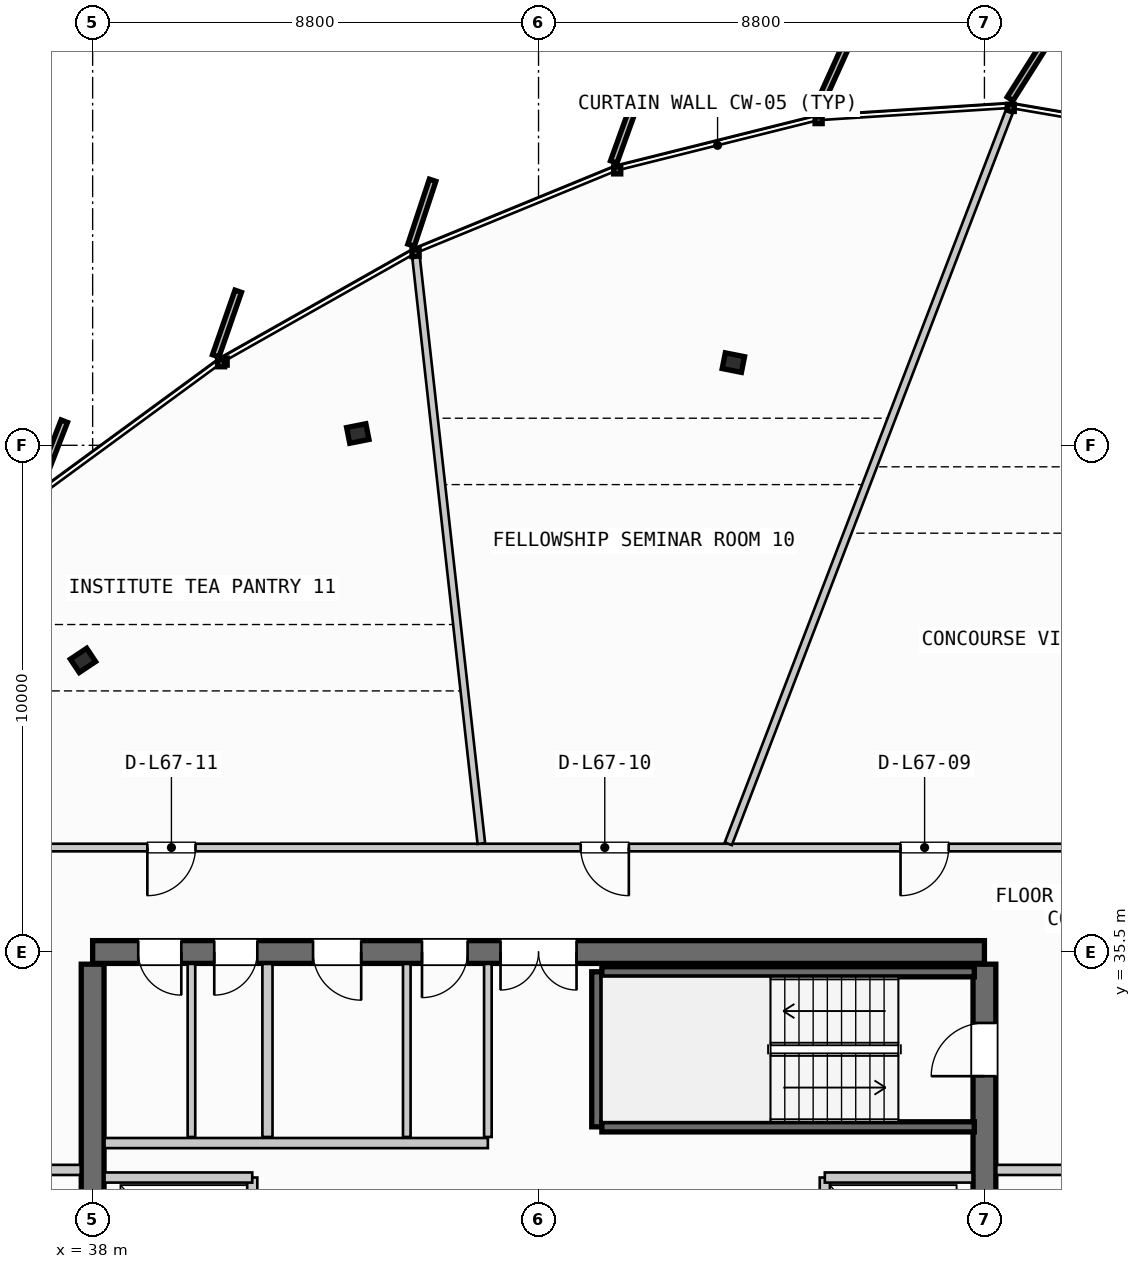
"""IFC4 building model, lengths in metres.
Left out: names, types, materials, properties, quantities, classifications, styles, units other than length and angle.
Written with IfcOpenShell. Run it as: python <this file> out.ifc"""

import sys

from ifc_helpers import new_model, si_unit, direction, frame, frame_2d, origin, origin_2d, place, context, subcontext, project, spatial, rectangle, i_section, extrude, source, transform, mapped, element, fill, save


model = new_model("IFC4")
c1 = context("Model", 3, precision=1e-05, world=origin(), true_north=direction((0.0, 1.0)))
c2 = subcontext(c1, "Body", "Model", "MODEL_VIEW")
j1 = project(units=[si_unit("LENGTHUNIT", "METRE"), si_unit("PLANEANGLEUNIT", "RADIAN")], contexts=[c1])
p1 = place(None, origin())
s1 = spatial("IfcSite", under=j1, at=p1, CompositionType="ELEMENT")
p2 = place(p1, origin())
s2 = spatial("IfcBuilding", under=s1, at=p2, CompositionType="ELEMENT")
p3 = place(p2, frame((0.0, 0.0, 256.0)))
s3 = spatial("IfcBuildingStorey", under=s2, at=p3, CompositionType="ELEMENT", Elevation=256.0)
p4 = place(p3, frame((55.6, 35.5, 0.0), z_axis=(0.0, 0.0, 1.0), x_axis=(-1.0, 0.0, 0.0)))
e1 = element("IfcWall", 1, at=p4, inside=s3, PredefinedType="SHEAR", context=c2, shape_type="SweptSolid", body=[
    extrude(rectangle(XDim=17.6, YDim=0.45, at=frame_2d((8.8, 0.0))), origin(), (0.0, 0.0, 1.0), 3.21),
])
p5 = place(p4, frame((8.05, 0.0, 0.0)))
e2 = element("IfcOpeningElement", 2, at=p5, cuts=e1, PredefinedType="OPENING", context=c2, shape_type="SweptSolid", body=[
    extrude(rectangle(XDim=1.5, YDim=2.2, at=frame_2d((0.75, 1.1))), frame((0.0, 0.235, 0.0), z_axis=(0.0, -1.0, 0.0), x_axis=(1.0, 0.0, 0.0)), (0.0, 0.0, 1.0), 0.47),
])
p6 = place(p4, frame((15.85, 0.0, 0.0)))
e3 = element("IfcOpeningElement", 3, at=p6, cuts=e1, PredefinedType="OPENING", context=c2, shape_type="SweptSolid", body=[
    extrude(rectangle(XDim=0.85, YDim=2.15, at=frame_2d((0.425, 1.075))), frame((0.0, 0.235, 0.0), z_axis=(0.0, -1.0, 0.0), x_axis=(1.0, 0.0, 0.0)), (0.0, 0.0, 1.0), 0.47),
])
p7 = place(p4, frame((14.35, 0.0, 0.0)))
e4 = element("IfcOpeningElement", 4, at=p7, cuts=e1, PredefinedType="OPENING", context=c2, shape_type="SweptSolid", body=[
    extrude(rectangle(XDim=0.85, YDim=2.15, at=frame_2d((0.425, 1.075))), frame((0.0, 0.235, 0.0), z_axis=(0.0, -1.0, 0.0), x_axis=(1.0, 0.0, 0.0)), (0.0, 0.0, 1.0), 0.47),
])
p8 = place(p4, frame((12.3, 0.0, 0.0)))
e5 = element("IfcOpeningElement", 5, at=p8, cuts=e1, PredefinedType="OPENING", context=c2, shape_type="SweptSolid", body=[
    extrude(rectangle(XDim=0.95, YDim=2.15, at=frame_2d((0.475, 1.075))), frame((0.0, 0.235, 0.0), z_axis=(0.0, -1.0, 0.0), x_axis=(1.0, 0.0, 0.0)), (0.0, 0.0, 1.0), 0.47),
])
p9 = place(p4, frame((10.2, 0.0, 0.0)))
e6 = element("IfcOpeningElement", 6, at=p9, cuts=e1, PredefinedType="OPENING", context=c2, shape_type="SweptSolid", body=[
    extrude(rectangle(XDim=0.9, YDim=2.15, at=frame_2d((0.45, 1.075))), frame((0.0, 0.235, 0.0), z_axis=(0.0, -1.0, 0.0), x_axis=(1.0, 0.0, 0.0)), (0.0, 0.0, 1.0), 0.47),
])
p10 = place(p3, frame((38.0, 35.26, 0.0), z_axis=(0.0, 0.0, 1.0), x_axis=(0.0, -1.0, 0.0)))
e7 = element("IfcWall", 7, at=p10, inside=s3, PredefinedType="SHEAR", context=c2, shape_type="SweptSolid", body=[
    extrude(rectangle(XDim=14.92, YDim=0.45, at=frame_2d((7.46, 0.0))), origin(), (0.0, 0.0, 1.0), 3.21),
])
p11 = place(p10, frame((5.21, 0.0, 0.0)))
e8 = element("IfcOpeningElement", 8, at=p11, cuts=e7, PredefinedType="OPENING", context=c2, shape_type="SweptSolid", body=[
    extrude(rectangle(XDim=1.1, YDim=2.2, at=frame_2d((0.55, 1.1))), frame((0.0, 0.235, 0.0), z_axis=(0.0, -1.0, 0.0), x_axis=(1.0, 0.0, 0.0)), (0.0, 0.0, 1.0), 0.47),
])
p12 = place(p3, frame((55.6, 20.34, 0.0), z_axis=(0.0, 0.0, 1.0), x_axis=(0.0, 1.0, 0.0)))
e9 = element("IfcWall", 9, at=p12, inside=s3, PredefinedType="SHEAR", context=c2, shape_type="SweptSolid", body=[
    extrude(rectangle(XDim=14.92, YDim=0.45, at=frame_2d((7.46, 0.0))), origin(), (0.0, 0.0, 1.0), 3.21),
])
p13 = place(p12, frame((12.71, 0.0, 0.0)))
e10 = element("IfcOpeningElement", 10, at=p13, cuts=e9, PredefinedType="OPENING", context=c2, shape_type="SweptSolid", body=[
    extrude(rectangle(XDim=1.05, YDim=2.15, at=frame_2d((0.525, 1.075))), frame((0.0, 0.235, 0.0), z_axis=(0.0, -1.0, 0.0), x_axis=(1.0, 0.0, 0.0)), (0.0, 0.0, 1.0), 0.47),
])
p14 = place(p12, frame((8.61, 0.0, 0.0)))
e11 = element("IfcOpeningElement", 11, at=p14, cuts=e9, PredefinedType="OPENING", context=c2, shape_type="SweptSolid", body=[
    extrude(rectangle(XDim=1.1, YDim=2.2, at=frame_2d((0.55, 1.1))), frame((0.0, 0.235, 0.0), z_axis=(0.0, -1.0, 0.0), x_axis=(1.0, 0.0, 0.0)), (0.0, 0.0, 1.0), 0.47),
])
m1 = source(origin(), c2, "Body", "SweptSolid", [
    extrude(i_section(OverallWidth=0.387, OverallDepth=0.316, WebThickness=0.019, FlangeThickness=0.028, FilletRadius=0.015, at=origin_2d()), origin(), (0.0, 0.0, 1.0), 3.21),
])
for number, where, z_axis, x_axis in (
    (12, (50.645, 47.132, 0.0), (0.0, 0.0, 1.0), (0.195, 0.981, 0.0)),
    (13, (43.233, 45.732, 0.0), (0.0, 0.0, 1.0), (-0.195, 0.981, 0.0)),
    (14, (37.81, 41.255, 0.0), (0.0, 0.0, 1.0), (-0.556, 0.831, 0.0)),
):
    element("IfcColumn", number, at=place(p3, frame(where, z_axis=z_axis, x_axis=x_axis)), inside=s3, PredefinedType="COLUMN", context=c2, shape_type="MappedRepresentation", body=[
        mapped(m1, transform((0.0, 0.0, 0.0), scale=1.0)),
    ])
p15 = place(p3, frame((47.95, 32.05, 0.0), z_axis=(0.0, 0.0, 1.0), x_axis=(0.0, 1.0, 0.0)))
e15 = element("IfcWall", 15, at=p15, inside=s3, PredefinedType="SHEAR", context=c2, shape_type="SweptSolid", body=[
    extrude(rectangle(XDim=3.06, YDim=0.2, at=frame_2d((1.53, 0.0))), origin(), (0.0, 0.0, 1.0), 3.21),
])
for number, where, z_axis, x_axis in (
    (16, (48.05, 35.11, 0.0), (0.0, 0.0, 1.0), (1.0, 0.0, 0.0)),
    (17, (55.4, 32.05, 0.0), (0.0, 0.0, 1.0), (-1.0, 0.0, 0.0)),
):
    element("IfcWall", number, at=place(p3, frame(where, z_axis=z_axis, x_axis=x_axis)), inside=s3, PredefinedType="SHEAR", context=c2, shape_type="SweptSolid", body=[
        extrude(rectangle(XDim=7.35, YDim=0.2, at=frame_2d((3.675, 0.0))), origin(), (0.0, 0.0, 1.0), 3.21),
    ])
p16 = place(p3, frame((41.15, 27.95, 0.0), z_axis=(0.0, 0.0, 1.0), x_axis=(0.0, 1.0, 0.0)))
e18 = element("IfcWall", 18, at=p16, inside=s3, PredefinedType="PARTITIONING", context=c2, shape_type="SweptSolid", body=[
    extrude(rectangle(XDim=3.1, YDim=0.2, at=frame_2d((1.55, 0.0))), origin(), (0.0, 0.0, 1.0), 2.28),
])
p17 = place(p3, frame((38.235, 31.05, 0.0), z_axis=(0.0, 0.0, 1.0), x_axis=(1.0, 0.0, 0.0)))
e19 = element("IfcWall", 19, at=p17, inside=s3, PredefinedType="PARTITIONING", context=c2, shape_type="SweptSolid", body=[
    extrude(rectangle(XDim=2.915, YDim=0.2, at=frame_2d((1.458, 0.0))), origin(), (0.0, 0.0, 1.0), 2.28),
])
p18 = place(p3, frame((34.5, 31.2, 0.0), z_axis=(0.0, 0.0, 1.0), x_axis=(1.0, 0.0, 0.0)))
e20 = element("IfcWall", 20, at=p18, inside=s3, PredefinedType="PARTITIONING", context=c2, shape_type="SweptSolid", body=[
    extrude(rectangle(XDim=3.265, YDim=0.2, at=frame_2d((1.632, 0.0))), origin(), (0.0, 0.0, 1.0), 2.28),
])
p19 = place(p3, frame((52.45, 27.95, 0.0), z_axis=(0.0, 0.0, 1.0), x_axis=(0.0, 1.0, 0.0)))
e21 = element("IfcWall", 21, at=p19, inside=s3, PredefinedType="PARTITIONING", context=c2, shape_type="SweptSolid", body=[
    extrude(rectangle(XDim=3.1, YDim=0.2, at=frame_2d((1.55, 0.0))), origin(), (0.0, 0.0, 1.0), 2.28),
])
p20 = place(p3, frame((52.45, 31.05, 0.0), z_axis=(0.0, 0.0, 1.0), x_axis=(1.0, 0.0, 0.0)))
e22 = element("IfcWall", 22, at=p20, inside=s3, PredefinedType="PARTITIONING", context=c2, shape_type="SweptSolid", body=[
    extrude(rectangle(XDim=2.915, YDim=0.2, at=frame_2d((1.458, 0.0))), origin(), (0.0, 0.0, 1.0), 2.28),
])
p21 = place(p3, frame((55.835, 31.2, 0.0), z_axis=(0.0, 0.0, 1.0), x_axis=(1.0, 0.0, 0.0)))
e23 = element("IfcWall", 23, at=p21, inside=s3, PredefinedType="PARTITIONING", context=c2, shape_type="SweptSolid", body=[
    extrude(rectangle(XDim=3.265, YDim=0.2, at=frame_2d((1.633, 0.0))), origin(), (0.0, 0.0, 1.0), 2.28),
])
p22 = place(p3, frame((41.45, 31.85, 0.0), z_axis=(0.0, 0.0, 1.0), x_axis=(0.0, 1.0, 0.0)))
e24 = element("IfcWall", 24, at=p22, inside=s3, PredefinedType="PARTITIONING", context=c2, shape_type="SweptSolid", body=[
    extrude(rectangle(XDim=3.415, YDim=0.2, at=frame_2d((1.708, 0.0))), origin(), (0.0, 0.0, 1.0), 2.28),
])
p23 = place(p3, frame((38.235, 31.73, 0.0), z_axis=(0.0, 0.0, 1.0), x_axis=(1.0, 0.0, 0.0)))
e25 = element("IfcWall", 25, at=p23, inside=s3, PredefinedType="PARTITIONING", context=c2, shape_type="SweptSolid", body=[
    extrude(rectangle(XDim=7.565, YDim=0.2, at=frame_2d((3.782, 0.0))), origin(), (0.0, 0.0, 1.0), 2.28),
])
for number, where, z_axis, x_axis in (
    (26, (45.8, 31.85, 0.0), (0.0, 0.0, 1.0), (0.0, 1.0, 0.0)),
    (27, (39.95, 31.85, 0.0), (0.0, 0.0, 1.0), (0.0, 1.0, 0.0)),
):
    element("IfcWall", number, at=place(p3, frame(where, z_axis=z_axis, x_axis=x_axis)), inside=s3, PredefinedType="PARTITIONING", context=c2, shape_type="SweptSolid", body=[
        extrude(rectangle(XDim=3.415, YDim=0.15, at=frame_2d((1.708, 0.0))), origin(), (0.0, 0.0, 1.0), 2.28),
    ])
p24 = place(p3, frame((44.2, 31.85, 0.0), z_axis=(0.0, 0.0, 1.0), x_axis=(0.0, 1.0, 0.0)))
e28 = element("IfcWall", 28, at=p24, inside=s3, PredefinedType="PLUMBINGWALL", context=c2, shape_type="SweptSolid", body=[
    extrude(rectangle(XDim=3.415, YDim=0.15, at=frame_2d((1.708, 0.0))), origin(), (0.0, 0.0, 1.0), 2.28),
])
p25 = place(p3, frame((60.888, 37.562, 0.0), z_axis=(0.0, 0.0, 1.0), x_axis=(-1.0, 0.0, 0.0)))
e29 = element("IfcWall", 29, at=p25, inside=s3, PredefinedType="PARTITIONING", context=c2, shape_type="SweptSolid", body=[
    extrude(rectangle(XDim=28.038, YDim=0.15, at=frame_2d((14.019, 0.0))), origin(), (0.0, 0.0, 1.0), 2.28),
])
p26 = place(p25, frame((5.994, 0.0, 0.0)))
e30 = element("IfcOpeningElement", 30, at=p26, cuts=e29, PredefinedType="OPENING", context=c2, shape_type="SweptSolid", body=[
    extrude(rectangle(XDim=0.95, YDim=2.15, at=frame_2d((0.475, 1.075))), frame((0.0, 0.085, 0.0), z_axis=(0.0, -1.0, 0.0), x_axis=(1.0, 0.0, 0.0)), (0.0, 0.0, 1.0), 0.17),
])
p27 = place(p25, frame((12.306, 0.0, 0.0)))
e31 = element("IfcOpeningElement", 31, at=p27, cuts=e29, PredefinedType="OPENING", context=c2, shape_type="SweptSolid", body=[
    extrude(rectangle(XDim=0.95, YDim=2.15, at=frame_2d((0.475, 1.075))), frame((0.0, 0.085, 0.0), z_axis=(0.0, -1.0, 0.0), x_axis=(1.0, 0.0, 0.0)), (0.0, 0.0, 1.0), 0.17),
])
p28 = place(p25, frame((20.858, 0.0, 0.0)))
e32 = element("IfcOpeningElement", 32, at=p28, cuts=e29, PredefinedType="OPENING", context=c2, shape_type="SweptSolid", body=[
    extrude(rectangle(XDim=0.95, YDim=2.15, at=frame_2d((0.475, 1.075))), frame((0.0, 0.085, 0.0), z_axis=(0.0, -1.0, 0.0), x_axis=(1.0, 0.0, 0.0)), (0.0, 0.0, 1.0), 0.17),
])
p29 = place(p3, frame((50.546, 37.637, 0.0), z_axis=(0.0, 0.0, 1.0), x_axis=(0.35830718527, 0.933603749448, 0.0)))
e33 = element("IfcWall", 33, at=p29, inside=s3, PredefinedType="PARTITIONING", context=c2, shape_type="SweptSolid", body=[
    extrude(rectangle(XDim=15.464, YDim=0.15, at=frame_2d((7.732, 0.0))), origin(), (0.0, 0.0, 1.0), 2.28),
])
p30 = place(p3, frame((45.671, 37.642, 0.0), z_axis=(0.0, 0.0, 1.0), x_axis=(-0.110707939732, 0.993852983132, 0.0)))
e34 = element("IfcWall", 34, at=p30, inside=s3, PredefinedType="PARTITIONING", context=c2, shape_type="SweptSolid", body=[
    extrude(rectangle(XDim=11.633, YDim=0.15, at=frame_2d((5.816, 0.0))), origin(), (0.0, 0.0, 1.0), 2.28),
])
m2 = source(origin(), c2, "Body", "SweptSolid", [
    extrude(rectangle(XDim=1.05, YDim=2.15, at=frame_2d((0.525, 1.075))), frame((0.0, 0.025, 0.0), z_axis=(0.0, -1.0, 0.0), x_axis=(1.0, 0.0, 0.0)), (0.0, 0.0, 1.0), 0.05),
])
p31 = place(p13, origin())
e35 = element("IfcDoor", 35, at=p31, inside=s3, OperationType="SINGLE_SWING_LEFT", PredefinedType="DOOR", context=c2, shape_type="MappedRepresentation", body=[
    mapped(m2, transform((0.0, 0.0, 0.0), scale=1.0)),
])
fill(e10, e35)
m3 = source(origin(), c2, "Body", "SweptSolid", [
    extrude(rectangle(XDim=1.5, YDim=2.2, at=frame_2d((0.75, 1.1))), frame((0.0, 0.025, 0.0), z_axis=(0.0, -1.0, 0.0), x_axis=(1.0, 0.0, 0.0)), (0.0, 0.0, 1.0), 0.05),
])
p32 = place(p5, origin())
e36 = element("IfcDoor", 36, at=p32, inside=s3, OperationType="DOUBLE_DOOR_SINGLE_SWING", PredefinedType="DOOR", context=c2, shape_type="MappedRepresentation", body=[
    mapped(m3, transform((0.0, 0.0, 0.0), scale=1.0)),
])
fill(e2, e36)
m4 = source(origin(), c2, "Body", "SweptSolid", [
    extrude(rectangle(XDim=0.85, YDim=2.15, at=frame_2d((0.425, 1.075))), frame((0.0, 0.025, 0.0), z_axis=(0.0, -1.0, 0.0), x_axis=(1.0, 0.0, 0.0)), (0.0, 0.0, 1.0), 0.05),
])
p33 = place(p6, origin())
e37 = element("IfcDoor", 37, at=p33, inside=s3, OperationType="SINGLE_SWING_LEFT", PredefinedType="DOOR", context=c2, shape_type="MappedRepresentation", body=[
    mapped(m4, transform((0.0, 0.0, 0.0), scale=1.0)),
])
fill(e3, e37)
p34 = place(p7, origin())
e38 = element("IfcDoor", 38, at=p34, inside=s3, OperationType="SINGLE_SWING_RIGHT", PredefinedType="DOOR", context=c2, shape_type="MappedRepresentation", body=[
    mapped(m4, transform((0.0, 0.0, 0.0), scale=1.0)),
])
fill(e4, e38)
m5 = source(origin(), c2, "Body", "SweptSolid", [
    extrude(rectangle(XDim=0.95, YDim=2.15, at=frame_2d((0.475, 1.075))), frame((0.0, 0.025, 0.0), z_axis=(0.0, -1.0, 0.0), x_axis=(1.0, 0.0, 0.0)), (0.0, 0.0, 1.0), 0.05),
])
p35 = place(p8, origin())
e39 = element("IfcDoor", 39, at=p35, inside=s3, OperationType="SINGLE_SWING_LEFT", PredefinedType="DOOR", context=c2, shape_type="MappedRepresentation", body=[
    mapped(m5, transform((0.0, 0.0, 0.0), scale=1.0)),
])
fill(e5, e39)
m6 = source(origin(), c2, "Body", "SweptSolid", [
    extrude(rectangle(XDim=0.9, YDim=2.15, at=frame_2d((0.45, 1.075))), frame((0.0, 0.025, 0.0), z_axis=(0.0, -1.0, 0.0), x_axis=(1.0, 0.0, 0.0)), (0.0, 0.0, 1.0), 0.05),
])
p36 = place(p9, origin())
e40 = element("IfcDoor", 40, at=p36, inside=s3, OperationType="SINGLE_SWING_RIGHT", PredefinedType="DOOR", context=c2, shape_type="MappedRepresentation", body=[
    mapped(m6, transform((0.0, 0.0, 0.0), scale=1.0)),
])
fill(e6, e40)
p37 = place(p26, origin())
e41 = element("IfcDoor", 41, at=p37, inside=s3, OperationType="SINGLE_SWING_RIGHT", PredefinedType="DOOR", context=c2, shape_type="MappedRepresentation", body=[
    mapped(m5, transform((0.0, 0.0, 0.0), scale=1.0)),
])
fill(e30, e41)
p38 = place(p27, origin())
e42 = element("IfcDoor", 42, at=p38, inside=s3, OperationType="SINGLE_SWING_LEFT", PredefinedType="DOOR", context=c2, shape_type="MappedRepresentation", body=[
    mapped(m5, transform((0.0, 0.0, 0.0), scale=1.0)),
])
fill(e31, e42)
p39 = place(p28, origin())
e43 = element("IfcDoor", 43, at=p39, inside=s3, OperationType="SINGLE_SWING_RIGHT", PredefinedType="DOOR", context=c2, shape_type="MappedRepresentation", body=[
    mapped(m5, transform((0.0, 0.0, 0.0), scale=1.0)),
])
fill(e32, e43)
save(model, sys.argv[1])
